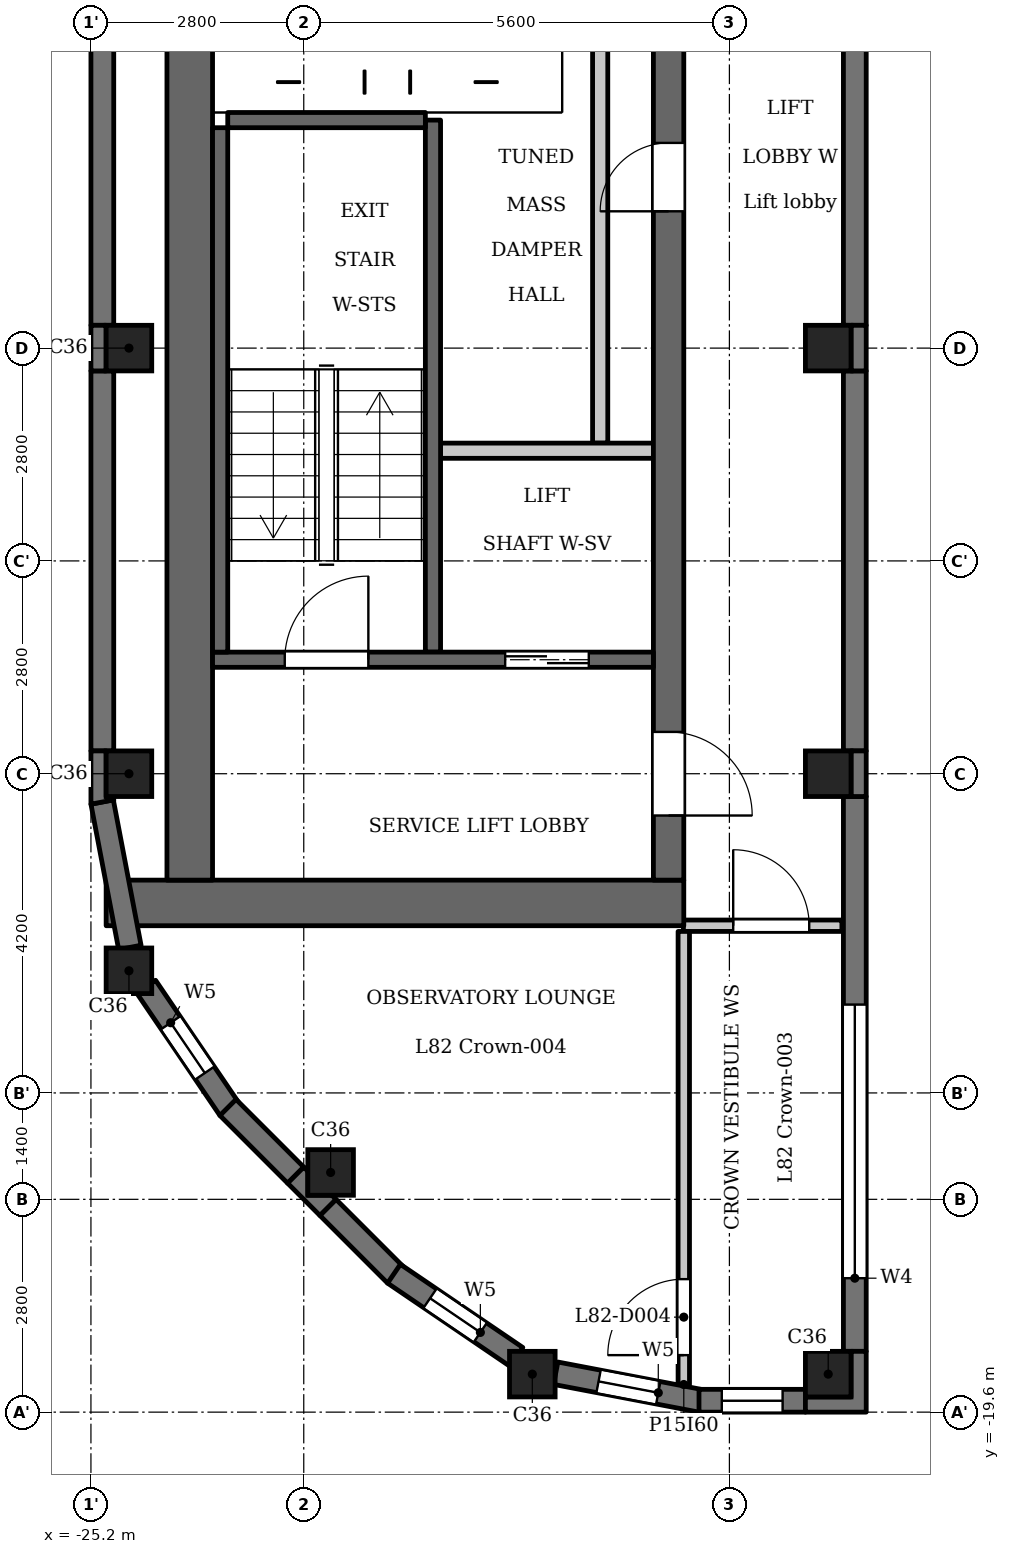
"""IFC4 building model, lengths in metres.
Left out: names, types, materials, properties, quantities, classifications, styles, units other than length and angle.
Written with IfcOpenShell. Run it as: python <this file> out.ifc"""

import sys

from ifc_helpers import new_model, si_unit, direction, frame, frame_2d, origin, origin_2d, place, context, subcontext, project, spatial, polyline, rectangle, outline, extrude, element, fill, save


model = new_model("IFC4")
c1 = context("Model", 3, precision=1e-05, world=origin(), true_north=direction((0.0, 1.0)))
c2 = subcontext(c1, "Body", "Model", "MODEL_VIEW")
j1 = project(units=[si_unit("LENGTHUNIT", "METRE"), si_unit("PLANEANGLEUNIT", "RADIAN")], contexts=[c1])
p1 = place(None, origin())
s1 = spatial("IfcSite", under=j1, at=p1, CompositionType="ELEMENT")
p2 = place(p1, origin())
s2 = spatial("IfcBuilding", under=s1, at=p2, CompositionType="ELEMENT")
p3 = place(p2, frame((0.0, 0.0, 317.4)))
s3 = spatial("IfcBuildingStorey", under=s2, at=p3, CompositionType="ELEMENT", Elevation=317.4)
for number, where, z_axis, x_axis in (
    (1, (-24.7, -13.793, 0.0), (0.0, 0.0, 1.0), (1.0, 0.0, 0.0)),
    (2, (-24.7, -11.2, 0.0), (0.0, 0.0, 1.0), (1.0, 0.0, 0.0)),
    (3, (-24.7, -5.6, 0.0), (0.0, 0.0, 1.0), (1.0, 0.0, 0.0)),
    (4, (-22.046, -16.446, 0.0), (0.0, 0.0, 1.0), (1.0, 0.0, 0.0)),
    (5, (-19.393, -19.1, 0.0), (0.0, 0.0, 1.0), (1.0, 0.0, 0.0)),
    (6, (-15.5, -19.1, 0.0), (0.0, 0.0, 1.0), (1.0, 0.0, 0.0)),
    (7, (-15.5, -11.2, 0.0), (0.0, 0.0, 1.0), (1.0, 0.0, 0.0)),
    (8, (-15.5, -5.6, 0.0), (0.0, 0.0, 1.0), (1.0, 0.0, 0.0)),
):
    element("IfcColumn", number, at=place(p3, frame(where, z_axis=z_axis, x_axis=x_axis)), inside=s3, PredefinedType="COLUMN", context=c2, shape_type="SweptSolid", body=[
        extrude(rectangle(XDim=0.6, YDim=0.6, at=origin_2d()), origin(), (0.0, 0.0, 1.0), 3.5),
    ])
p4 = place(p3, frame((-19.085, -19.088, 0.0), z_axis=(0.0, 0.0, 1.0), x_axis=(0.982286967073, -0.187382801553, 0.0)))
e9 = element("IfcWall", 9, at=p4, inside=s3, PredefinedType="SOLIDWALL", context=c2, shape_type="SweptSolid", body=[
    extrude(rectangle(XDim=1.948, YDim=0.3, at=frame_2d((0.974, 0.0))), origin(), (0.0, 0.0, 1.0), 2.6),
])
p5 = place(p4, frame((0.574, 0.0, 0.6)))
e10 = element("IfcOpeningElement", 10, at=p5, cuts=e9, PredefinedType="OPENING", context=c2, shape_type="SweptSolid", body=[
    extrude(rectangle(XDim=0.8, YDim=1.55, at=frame_2d((0.4, 0.775))), frame((0.0, 0.16, 0.0), z_axis=(0.0, -1.0, 0.0), x_axis=(1.0, 0.0, 0.0)), (0.0, 0.0, 1.0), 0.32),
])
p6 = place(p3, frame((-17.2, -19.45, 0.0), z_axis=(0.0, 0.0, 1.0), x_axis=(1.0, 0.0, 0.0)))
e11 = element("IfcWall", 11, at=p6, inside=s3, PredefinedType="SOLIDWALL", context=c2, shape_type="SweptSolid", body=[
    extrude(rectangle(XDim=1.4, YDim=0.3, at=frame_2d((0.7, 0.0))), origin(), (0.0, 0.0, 1.0), 3.2),
])
p7 = place(p6, frame((0.3, 0.0, 0.6)))
e12 = element("IfcOpeningElement", 12, at=p7, cuts=e11, PredefinedType="OPENING", context=c2, shape_type="SweptSolid", body=[
    extrude(rectangle(XDim=0.8, YDim=1.55, at=frame_2d((0.4, 0.775))), frame((0.0, 0.16, 0.0), z_axis=(0.0, -1.0, 0.0), x_axis=(1.0, 0.0, 0.0)), (0.0, 0.0, 1.0), 0.32),
])
p8 = place(p3, frame((-15.15, -18.8, 0.0), z_axis=(0.0, 0.0, 1.0), x_axis=(0.0, 1.0, 0.0)))
e13 = element("IfcWall", 13, at=p8, inside=s3, PredefinedType="SOLIDWALL", context=c2, shape_type="SweptSolid", body=[
    extrude(rectangle(XDim=7.3, YDim=0.3, at=frame_2d((3.65, 0.0))), origin(), (0.0, 0.0, 1.0), 3.2),
])
p9 = place(p8, frame((0.962, 0.0, 1.2)))
e14 = element("IfcOpeningElement", 14, at=p9, cuts=e13, PredefinedType="OPENING", context=c2, shape_type="SweptSolid", body=[
    extrude(rectangle(XDim=3.6, YDim=0.95, at=frame_2d((1.8, 0.475))), frame((0.0, 0.16, 0.0), z_axis=(0.0, -1.0, 0.0), x_axis=(1.0, 0.0, 0.0)), (0.0, 0.0, 1.0), 0.32),
])
p10 = place(p3, frame((-15.15, -10.9, 0.0), z_axis=(0.0, 0.0, 1.0), x_axis=(0.0, 1.0, 0.0)))
e15 = element("IfcWall", 15, at=p10, inside=s3, PredefinedType="SOLIDWALL", context=c2, shape_type="SweptSolid", body=[
    extrude(rectangle(XDim=5.0, YDim=0.3, at=frame_2d((2.5, 0.0))), origin(), (0.0, 0.0, 1.0), 3.2),
])
for number, where, z_axis, x_axis in (
    (16, (-15.15, -5.3, 0.0), (0.0, 0.0, 1.0), (0.0, 1.0, 0.0)),
    (17, (-25.05, 5.3, 0.0), (0.0, 0.0, 1.0), (0.0, -1.0, 0.0)),
):
    element("IfcWall", number, at=place(p3, frame(where, z_axis=z_axis, x_axis=x_axis)), inside=s3, PredefinedType="SOLIDWALL", context=c2, shape_type="SweptSolid", body=[
        extrude(rectangle(XDim=10.6, YDim=0.3, at=frame_2d((5.3, 0.0))), origin(), (0.0, 0.0, 1.0), 3.2),
    ])
p11 = place(p3, frame((-25.05, -5.9, 0.0), z_axis=(0.0, 0.0, 1.0), x_axis=(0.0, -1.0, 0.0)))
e18 = element("IfcWall", 18, at=p11, inside=s3, PredefinedType="SOLIDWALL", context=c2, shape_type="SweptSolid", body=[
    extrude(rectangle(XDim=5.0, YDim=0.3, at=frame_2d((2.5, 0.0))), origin(), (0.0, 0.0, 1.0), 3.2),
])
p12 = place(p3, frame((-25.052, -11.573, 0.0), z_axis=(0.0, 0.0, 1.0), x_axis=(0.187354129902, -0.982292436095, 0.0)))
e19 = element("IfcWall", 19, at=p12, inside=s3, PredefinedType="SOLIDWALL", context=c2, shape_type="SweptSolid", body=[
    extrude(rectangle(XDim=1.947, YDim=0.3, at=frame_2d((0.973, 0.0))), origin(), (0.0, 0.0, 1.0), 2.6),
])
p13 = place(p3, frame((-24.474, -14.002, 0.0), z_axis=(0.0, 0.0, 1.0), x_axis=(0.562025435703, -0.827119948752, 0.0)))
e20 = element("IfcWall", 20, at=p13, inside=s3, PredefinedType="SOLIDWALL", context=c2, shape_type="SweptSolid", body=[
    extrude(rectangle(XDim=1.948, YDim=0.3, at=frame_2d((0.974, 0.0))), origin(), (0.0, 0.0, 1.0), 2.6),
])
p14 = place(p13, frame((0.574, 0.0, 0.6)))
e21 = element("IfcOpeningElement", 21, at=p14, cuts=e20, PredefinedType="OPENING", context=c2, shape_type="SweptSolid", body=[
    extrude(rectangle(XDim=0.8, YDim=1.55, at=frame_2d((0.4, 0.775))), frame((0.0, 0.16, 0.0), z_axis=(0.0, -1.0, 0.0), x_axis=(1.0, 0.0, 0.0)), (0.0, 0.0, 1.0), 0.32),
])
for number, where, z_axis, x_axis in (
    (22, (-23.397, -15.591, 0.0), (0.0, 0.0, 1.0), (0.707, -0.707, 0.0)),
    (23, (-22.082, -16.906, 0.0), (0.0, 0.0, 1.0), (0.707, -0.707, 0.0)),
):
    element("IfcWall", number, at=place(p3, frame(where, z_axis=z_axis, x_axis=x_axis)), inside=s3, PredefinedType="SOLIDWALL", context=c2, shape_type="SweptSolid", body=[
        extrude(rectangle(XDim=1.26, YDim=0.3, at=frame_2d((0.63, 0.0))), origin(), (0.0, 0.0, 1.0), 3.2),
    ])
p15 = place(p3, frame((-21.213, -17.779, 0.0), z_axis=(0.0, 0.0, 1.0), x_axis=(0.827022075481, -0.562169446579, 0.0)))
e24 = element("IfcWall", 24, at=p15, inside=s3, PredefinedType="SOLIDWALL", context=c2, shape_type="SweptSolid", body=[
    extrude(rectangle(XDim=1.948, YDim=0.3, at=frame_2d((0.974, 0.0))), origin(), (0.0, 0.0, 1.0), 2.6),
])
p16 = place(p15, frame((0.574, 0.0, 0.6)))
e25 = element("IfcOpeningElement", 25, at=p16, cuts=e24, PredefinedType="OPENING", context=c2, shape_type="SweptSolid", body=[
    extrude(rectangle(XDim=0.8, YDim=1.55, at=frame_2d((0.4, 0.775))), frame((0.0, 0.16, 0.0), z_axis=(0.0, -1.0, 0.0), x_axis=(1.0, 0.0, 0.0)), (0.0, 0.0, 1.0), 0.32),
])
p17 = place(p3, frame((-20.7, -9.6, 0.0), z_axis=(0.0, 0.0, 1.0), x_axis=(0.0, 1.0, 0.0)))
e26 = element("IfcWall", 26, at=p17, inside=s3, PredefinedType="SHEAR", context=c2, shape_type="SweptSolid", body=[
    extrude(rectangle(XDim=7.0, YDim=0.2, at=frame_2d((3.5, 0.0))), origin(), (0.0, 0.0, 1.0), 3.2),
])
p18 = place(p3, frame((-17.4, -12.9, 0.0), z_axis=(0.0, 0.0, 1.0), x_axis=(-1.0, 0.0, 0.0)))
e27 = element("IfcWall", 27, at=p18, inside=s3, PredefinedType="SHEAR", context=c2, shape_type="SweptSolid", body=[
    extrude(rectangle(XDim=7.6, YDim=0.6, at=frame_2d((3.8, 0.0))), origin(), (0.0, 0.0, 1.0), 3.2),
])
p19 = place(p3, frame((-18.5, -6.85, 0.0), z_axis=(0.0, 0.0, 1.0), x_axis=(0.0, 1.0, 0.0)))
e28 = element("IfcWall", 28, at=p19, inside=s3, PredefinedType="PARTITIONING", context=c2, shape_type="SweptSolid", body=[
    extrude(rectangle(XDim=7.0, YDim=0.2, at=frame_2d((3.5, 0.0))), origin(), (0.0, 0.0, 1.0), 3.2),
])
p20 = place(p3, frame((-17.6, -12.6, 0.0), z_axis=(0.0, 0.0, 1.0), x_axis=(0.0, 1.0, 0.0)))
e29 = element("IfcWall", 29, at=p20, inside=s3, PredefinedType="SHEAR", context=c2, shape_type="SweptSolid", body=[
    extrude(rectangle(XDim=25.2, YDim=0.4, at=frame_2d((12.6, 0.0))), origin(), (0.0, 0.0, 1.0), 3.2),
])
p21 = place(p20, frame((8.8, 0.0, 0.0)))
e30 = element("IfcOpeningElement", 30, at=p21, cuts=e29, PredefinedType="OPENING", context=c2, shape_type="SweptSolid", body=[
    extrude(rectangle(XDim=0.9, YDim=2.1, at=frame_2d((0.45, 1.05))), frame((0.0, 0.21, 0.0), z_axis=(0.0, -1.0, 0.0), x_axis=(1.0, 0.0, 0.0)), (0.0, 0.0, 1.0), 0.42),
])
p22 = place(p20, frame((17.05, 0.0, 0.0)))
e31 = element("IfcOpeningElement", 31, at=p22, cuts=e29, PredefinedType="OPENING", context=c2, shape_type="SweptSolid", body=[
    extrude(rectangle(XDim=0.9, YDim=2.1, at=frame_2d((0.45, 1.05))), frame((0.0, 0.21, 0.0), z_axis=(0.0, -1.0, 0.0), x_axis=(1.0, 0.0, 0.0)), (0.0, 0.0, 1.0), 0.42),
])
p23 = place(p20, frame((23.25, 0.0, 0.0)))
e32 = element("IfcOpeningElement", 32, at=p23, cuts=e29, PredefinedType="OPENING", context=c2, shape_type="SweptSolid", body=[
    extrude(rectangle(XDim=1.1, YDim=2.1, at=frame_2d((0.55, 1.05))), frame((0.0, 0.21, 0.0), z_axis=(0.0, -1.0, 0.0), x_axis=(1.0, 0.0, 0.0)), (0.0, 0.0, 1.0), 0.42),
])
p24 = place(p20, frame((0.85, 0.0, 0.0)))
e33 = element("IfcOpeningElement", 33, at=p24, cuts=e29, PredefinedType="OPENING", context=c2, shape_type="SweptSolid", body=[
    extrude(rectangle(XDim=1.1, YDim=2.1, at=frame_2d((0.55, 1.05))), frame((0.0, 0.21, 0.0), z_axis=(0.0, -1.0, 0.0), x_axis=(1.0, 0.0, 0.0)), (0.0, 0.0, 1.0), 0.42),
])
p25 = place(p20, frame((13.075, 0.0, 0.0)))
e34 = element("IfcOpeningElement", 34, at=p25, cuts=e29, PredefinedType="OPENING", context=c2, shape_type="SweptSolid", body=[
    extrude(rectangle(XDim=1.8, YDim=2.1, at=frame_2d((0.9, 1.05))), frame((0.0, 0.21, 0.0), z_axis=(0.0, -1.0, 0.0), x_axis=(1.0, 0.0, 0.0)), (0.0, 0.0, 1.0), 0.42),
])
p26 = place(p3, frame((-23.9, -12.6, 0.0), z_axis=(0.0, 0.0, 1.0), x_axis=(0.0, 1.0, 0.0)))
e35 = element("IfcWall", 35, at=p26, inside=s3, PredefinedType="SHEAR", context=c2, shape_type="SweptSolid", body=[
    extrude(rectangle(XDim=25.2, YDim=0.6, at=frame_2d((12.6, 0.0))), origin(), (0.0, 0.0, 1.0), 3.2),
])
p27 = place(p3, frame((-17.8, -9.7, 0.0), z_axis=(0.0, 0.0, 1.0), x_axis=(-1.0, 0.0, 0.0)))
e36 = element("IfcWall", 36, at=p27, inside=s3, PredefinedType="SHEAR", context=c2, shape_type="SweptSolid", body=[
    extrude(rectangle(XDim=5.8, YDim=0.2, at=frame_2d((2.9, 0.0))), origin(), (0.0, 0.0, 1.0), 3.2),
])
p28 = place(p27, frame((0.85, 0.0, 0.0)))
e37 = element("IfcOpeningElement", 37, at=p28, cuts=e36, PredefinedType="OPENING", context=c2, shape_type="SweptSolid", body=[
    extrude(rectangle(XDim=1.1, YDim=2.1, at=frame_2d((0.55, 1.05))), frame((0.0, 0.11, 0.0), z_axis=(0.0, -1.0, 0.0), x_axis=(1.0, 0.0, 0.0)), (0.0, 0.0, 1.0), 0.22),
])
p29 = place(p27, frame((3.75, 0.0, 0.0)))
e38 = element("IfcOpeningElement", 38, at=p29, cuts=e36, PredefinedType="OPENING", context=c2, shape_type="SweptSolid", body=[
    extrude(rectangle(XDim=1.1, YDim=2.1, at=frame_2d((0.55, 1.05))), frame((0.0, 0.11, 0.0), z_axis=(0.0, -1.0, 0.0), x_axis=(1.0, 0.0, 0.0)), (0.0, 0.0, 1.0), 0.22),
])
p30 = place(p3, frame((-17.8, -6.95, 0.0), z_axis=(0.0, 0.0, 1.0), x_axis=(-1.0, 0.0, 0.0)))
e39 = element("IfcWall", 39, at=p30, inside=s3, PredefinedType="PARTITIONING", context=c2, shape_type="SweptSolid", body=[
    extrude(rectangle(XDim=2.8, YDim=0.2, at=frame_2d((1.4, 0.0))), origin(), (0.0, 0.0, 1.0), 3.2),
])
p31 = place(p3, frame((-23.5, -9.6, 0.0), z_axis=(0.0, 0.0, 1.0), x_axis=(0.0, 1.0, 0.0)))
e40 = element("IfcWall", 40, at=p31, inside=s3, PredefinedType="SHEAR", context=c2, shape_type="SweptSolid", body=[
    extrude(rectangle(XDim=6.9, YDim=0.2, at=frame_2d((3.45, 0.0))), origin(), (0.0, 0.0, 1.0), 3.2),
])
p32 = place(p3, frame((-20.8, -2.6, 0.0), z_axis=(0.0, 0.0, 1.0), x_axis=(-1.0, 0.0, 0.0)))
e41 = element("IfcWall", 41, at=p32, inside=s3, PredefinedType="SHEAR", context=c2, shape_type="SweptSolid", body=[
    extrude(rectangle(XDim=2.6, YDim=0.2, at=frame_2d((1.3, 0.0))), origin(), (0.0, 0.0, 1.0), 3.2),
])
p33 = place(p3, frame((-17.405, -13.2, 0.0), z_axis=(0.0, 0.0, 1.0), x_axis=(1.0, 0.0, 0.0)))
e42 = element("IfcWall", 42, at=p33, inside=s3, PredefinedType="PARTITIONING", context=c2, shape_type="SweptSolid", body=[
    extrude(rectangle(XDim=2.085, YDim=0.15, at=frame_2d((1.042, 0.0))), origin(), (0.0, 0.0, 1.0), 3.2),
])
p34 = place(p33, frame((0.655, 0.0, 0.0)))
e43 = element("IfcOpeningElement", 43, at=p34, cuts=e42, PredefinedType="OPENING", context=c2, shape_type="SweptSolid", body=[
    extrude(rectangle(XDim=1.0, YDim=2.1, at=frame_2d((0.5, 1.05))), frame((0.0, 0.085, 0.0), z_axis=(0.0, -1.0, 0.0), x_axis=(1.0, 0.0, 0.0)), (0.0, 0.0, 1.0), 0.17),
])
p35 = place(p3, frame((-17.4, -19.236, 0.0), z_axis=(0.0, 0.0, 1.0), x_axis=(0.0, 1.0, 0.0)))
e44 = element("IfcWall", 44, at=p35, inside=s3, PredefinedType="PARTITIONING", context=c2, shape_type="SweptSolid", body=[
    extrude(rectangle(XDim=5.961, YDim=0.15, at=frame_2d((2.981, 0.0))), origin(), (0.0, 0.0, 1.0), 3.2),
])
p36 = place(p35, frame((0.386, 0.0, 0.0)))
e45 = element("IfcOpeningElement", 45, at=p36, cuts=e44, PredefinedType="OPENING", context=c2, shape_type="SweptSolid", body=[
    extrude(rectangle(XDim=1.0, YDim=2.1, at=frame_2d((0.5, 1.05))), frame((0.0, 0.085, 0.0), z_axis=(0.0, -1.0, 0.0), x_axis=(1.0, 0.0, 0.0)), (0.0, 0.0, 1.0), 0.17),
])
p37 = place(p3, origin())
e46 = element("IfcWall", 46, at=p37, inside=s3, PredefinedType="SOLIDWALL", context=c2, shape_type="SweptSolid", body=[
    extrude(outline(polyline([(-22.4, -16.376), (-22.612, -16.588), (-22.188, -17.012), (-21.976, -16.8), (-22.029, -16.746), (-22.346, -16.746), (-22.346, -16.429), (-22.4, -16.376)])), origin(), (0.0, 0.0, 1.0), 3.2),
])
e47 = element("IfcWall", 47, at=p37, inside=s3, PredefinedType="SOLIDWALL", context=c2, shape_type="SweptSolid", body=[
    extrude(outline(polyline([(-25.2, -10.9), (-25.2, -11.601), (-24.903, -11.544), (-24.9, -11.561), (-24.9, -11.5), (-25.0, -11.5), (-25.0, -10.9), (-25.2, -10.9)])), origin(), (0.0, 0.0, 1.0), 3.2),
])
e48 = element("IfcWall", 48, at=p37, inside=s3, PredefinedType="SOLIDWALL", context=c2, shape_type="SweptSolid", body=[
    extrude(outline(polyline([(-25.0, -5.3), (-25.2, -5.3), (-25.2, -5.9), (-24.9, -5.9), (-25.0, -5.9), (-25.0, -5.3)])), origin(), (0.0, 0.0, 1.0), 3.2),
])
e49 = element("IfcWall", 49, at=p37, inside=s3, PredefinedType="SOLIDWALL", context=c2, shape_type="SweptSolid", body=[
    extrude(outline(polyline([(-15.3, -5.9), (-15.0, -5.9), (-15.0, -5.3), (-15.3, -5.3), (-15.2, -5.3), (-15.2, -5.9), (-15.3, -5.9)])), origin(), (0.0, 0.0, 1.0), 3.2),
])
e50 = element("IfcWall", 50, at=p37, inside=s3, PredefinedType="SOLIDWALL", context=c2, shape_type="SweptSolid", body=[
    extrude(outline(polyline([(-15.2, -11.5), (-15.0, -11.5), (-15.0, -10.9), (-15.2, -10.9), (-15.2, -11.5)])), origin(), (0.0, 0.0, 1.0), 3.2),
])
e51 = element("IfcWall", 51, at=p37, inside=s3, PredefinedType="SOLIDWALL", context=c2, shape_type="SweptSolid", body=[
    extrude(outline(polyline([(-15.8, -19.6), (-15.0, -19.6), (-15.0, -18.8), (-15.2, -18.8), (-15.2, -19.4), (-15.8, -19.4), (-15.8, -19.6)])), origin(), (0.0, 0.0, 1.0), 3.2),
])
p38 = place(p28, origin())
e52 = element("IfcDoor", 52, at=p38, inside=s3, OperationType="DOUBLE_DOOR_SLIDING", PredefinedType="DOOR", context=c2, shape_type="SweptSolid", body=[
    extrude(rectangle(XDim=1.1, YDim=2.1, at=frame_2d((0.55, 1.05))), frame((0.0, 0.025, 0.0), z_axis=(0.0, -1.0, 0.0), x_axis=(1.0, 0.0, 0.0)), (0.0, 0.0, 1.0), 0.05),
])
fill(e37, e52)
p39 = place(p21, origin())
e53 = element("IfcDoor", 53, at=p39, inside=s3, OperationType="SINGLE_SWING_RIGHT", PredefinedType="DOOR", context=c2, shape_type="SweptSolid", body=[
    extrude(rectangle(XDim=0.9, YDim=2.1, at=frame_2d((0.45, 1.05))), frame((0.0, 0.025, 0.0), z_axis=(0.0, -1.0, 0.0), x_axis=(1.0, 0.0, 0.0)), (0.0, 0.0, 1.0), 0.05),
])
fill(e30, e53)
p40 = place(p24, origin())
e54 = element("IfcDoor", 54, at=p40, inside=s3, OperationType="SINGLE_SWING_LEFT", PredefinedType="DOOR", context=c2, shape_type="SweptSolid", body=[
    extrude(rectangle(XDim=1.1, YDim=2.1, at=frame_2d((0.55, 1.05))), frame((0.0, 0.025, 0.0), z_axis=(0.0, -1.0, 0.0), x_axis=(1.0, 0.0, 0.0)), (0.0, 0.0, 1.0), 0.05),
])
fill(e33, e54)
p41 = place(p29, origin())
e55 = element("IfcDoor", 55, at=p41, inside=s3, OperationType="SINGLE_SWING_LEFT", PredefinedType="DOOR", context=c2, shape_type="SweptSolid", body=[
    extrude(rectangle(XDim=1.1, YDim=2.1, at=frame_2d((0.55, 1.05))), frame((0.0, 0.025, 0.0), z_axis=(0.0, -1.0, 0.0), x_axis=(1.0, 0.0, 0.0)), (0.0, 0.0, 1.0), 0.05),
])
fill(e38, e55)
p42 = place(p34, origin())
e56 = element("IfcDoor", 56, at=p42, inside=s3, OperationType="SINGLE_SWING_RIGHT", PredefinedType="DOOR", context=c2, shape_type="SweptSolid", body=[
    extrude(rectangle(XDim=1.0, YDim=2.1, at=frame_2d((0.5, 1.05))), frame((0.0, 0.025, 0.0), z_axis=(0.0, -1.0, 0.0), x_axis=(1.0, 0.0, 0.0)), (0.0, 0.0, 1.0), 0.05),
])
fill(e43, e56)
p43 = place(p36, origin())
e57 = element("IfcDoor", 57, at=p43, inside=s3, OperationType="SINGLE_SWING_RIGHT", PredefinedType="DOOR", context=c2, shape_type="SweptSolid", body=[
    extrude(rectangle(XDim=1.0, YDim=2.1, at=frame_2d((0.5, 1.05))), frame((0.0, 0.025, 0.0), z_axis=(0.0, -1.0, 0.0), x_axis=(1.0, 0.0, 0.0)), (0.0, 0.0, 1.0), 0.05),
])
fill(e45, e57)
p44 = place(p5, origin())
e58 = element("IfcWindow", 58, at=p44, inside=s3, PartitioningType="SINGLE_PANEL", PredefinedType="WINDOW", context=c2, shape_type="SweptSolid", body=[
    extrude(rectangle(XDim=0.8, YDim=1.55, at=frame_2d((0.4, 0.775))), frame((0.0, 0.03, 0.0), z_axis=(0.0, -1.0, 0.0), x_axis=(1.0, 0.0, 0.0)), (0.0, 0.0, 1.0), 0.06),
])
fill(e10, e58)
p45 = place(p7, origin())
e59 = element("IfcWindow", 59, at=p45, inside=s3, PartitioningType="SINGLE_PANEL", PredefinedType="WINDOW", context=c2, shape_type="SweptSolid", body=[
    extrude(rectangle(XDim=0.8, YDim=1.55, at=frame_2d((0.4, 0.775))), frame((0.0, 0.03, 0.0), z_axis=(0.0, -1.0, 0.0), x_axis=(1.0, 0.0, 0.0)), (0.0, 0.0, 1.0), 0.06),
])
fill(e12, e59)
p46 = place(p9, origin())
e60 = element("IfcWindow", 60, at=p46, inside=s3, PartitioningType="SINGLE_PANEL", PredefinedType="WINDOW", context=c2, shape_type="SweptSolid", body=[
    extrude(rectangle(XDim=3.6, YDim=0.95, at=frame_2d((1.8, 0.475))), frame((0.0, 0.03, 0.0), z_axis=(0.0, -1.0, 0.0), x_axis=(1.0, 0.0, 0.0)), (0.0, 0.0, 1.0), 0.06),
])
fill(e14, e60)
p47 = place(p14, origin())
e61 = element("IfcWindow", 61, at=p47, inside=s3, PartitioningType="SINGLE_PANEL", PredefinedType="WINDOW", context=c2, shape_type="SweptSolid", body=[
    extrude(rectangle(XDim=0.8, YDim=1.55, at=frame_2d((0.4, 0.775))), frame((0.0, 0.03, 0.0), z_axis=(0.0, -1.0, 0.0), x_axis=(1.0, 0.0, 0.0)), (0.0, 0.0, 1.0), 0.06),
])
fill(e21, e61)
p48 = place(p16, origin())
e62 = element("IfcWindow", 62, at=p48, inside=s3, PartitioningType="SINGLE_PANEL", PredefinedType="WINDOW", context=c2, shape_type="SweptSolid", body=[
    extrude(rectangle(XDim=0.8, YDim=1.55, at=frame_2d((0.4, 0.775))), frame((0.0, 0.03, 0.0), z_axis=(0.0, -1.0, 0.0), x_axis=(1.0, 0.0, 0.0)), (0.0, 0.0, 1.0), 0.06),
])
fill(e25, e62)
save(model, sys.argv[1])
